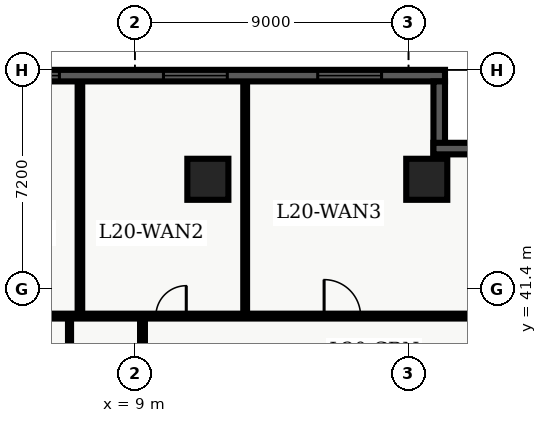
"""IFC4 building model, lengths in metres.
Left out: names, types, materials, properties, quantities, classifications, styles, units other than length and angle.
Written with IfcOpenShell. Run it as: python <this file> out.ifc"""

import sys

from ifc_helpers import new_model, entity, si_unit, converted_unit, direction, frame, origin_with_axes, origin_2d_with_axis, place, context, subcontext, project, spatial, polyline, rectangle, outline, extrude, element, fill, save


model = new_model("IFC4")
c1 = context("Model", 3, precision=1e-05, world=origin_with_axes(), true_north=direction((0.0, 1.0)))
c2 = subcontext(c1, "Body", "Model", "MODEL_VIEW")
j1 = project(units=[si_unit("LENGTHUNIT", "METRE"), converted_unit("PLANEANGLEUNIT", "DEGREE", entity("IfcPlaneAngleMeasure", 0.017), si_unit("PLANEANGLEUNIT", "RADIAN"), dimensions=[0, 0, 0, 0, 0, 0, 0])], contexts=[c1])
p1 = place(None, origin_with_axes())
s1 = spatial("IfcSite", under=j1, at=p1, CompositionType="ELEMENT")
p2 = place(p1, origin_with_axes())
s2 = spatial("IfcBuilding", under=s1, at=p2, CompositionType="ELEMENT")
p3 = place(p2, frame((0.0, 0.0, 84.6), z_axis=(0.0, 0.0, 1.0), x_axis=(1.0, 0.0, 0.0)))
s3 = spatial("IfcBuildingStorey", under=s2, at=p3, CompositionType="ELEMENT", Elevation=84.6)
for number, where, z_axis, x_axis in (
    (1, (11.4, 45.0, 0.0), (0.0, 0.0, 1.0), (1.0, 0.0, 0.0)),
    (2, (18.6, 45.0, 0.0), (0.0, 0.0, 1.0), (1.0, 0.0, 0.0)),
):
    element("IfcColumn", number, at=place(p3, frame(where, z_axis=z_axis, x_axis=x_axis)), inside=s3, PredefinedType="COLUMN", context=c2, shape_type="SweptSolid", body=[
        extrude(rectangle(XDim=1.35, YDim=1.35, at=origin_2d_with_axis()), origin_with_axes(), (0.0, 0.0, 1.0), 4.5),
    ])
p4 = place(p3, frame((2.6, 40.5, 0.0), z_axis=(0.0, 0.0, 1.0), x_axis=(1.0, 0.0, 0.0)))
e3 = element("IfcWall", 3, at=p4, inside=s3, PredefinedType="PARTITIONING", context=c2, shape_type="SweptSolid", body=[
    extrude(outline(polyline([(0.0, -0.08), (18.65, -0.08), (18.65, 0.08), (0.0, 0.08), (0.0, -0.08)])), origin_with_axes(), (0.0, 0.0, 1.0), 3.2),
])
p5 = place(p4, frame((2.291, 0.0, 0.0), z_axis=(0.0, 0.0, 1.0), x_axis=(1.0, 0.0, 0.0)))
e4 = element("IfcOpeningElement", 4, at=p5, cuts=e3, PredefinedType="OPENING", context=c2, shape_type="SweptSolid", body=[
    extrude(rectangle(XDim=1.0, YDim=0.18, at=origin_2d_with_axis()), origin_with_axes(), (0.0, 0.0, 1.0), 2.15),
])
p6 = place(p4, frame((7.59, 0.0, 0.0), z_axis=(0.0, 0.0, 1.0), x_axis=(1.0, 0.0, 0.0)))
e5 = element("IfcOpeningElement", 5, at=p6, cuts=e3, PredefinedType="OPENING", context=c2, shape_type="SweptSolid", body=[
    extrude(rectangle(XDim=1.0, YDim=0.18, at=origin_2d_with_axis()), origin_with_axes(), (0.0, 0.0, 1.0), 2.15),
])
p7 = place(p4, frame((13.223, 0.0, 0.0), z_axis=(0.0, 0.0, 1.0), x_axis=(1.0, 0.0, 0.0)))
e6 = element("IfcOpeningElement", 6, at=p7, cuts=e3, PredefinedType="OPENING", context=c2, shape_type="SweptSolid", body=[
    extrude(rectangle(XDim=1.2, YDim=0.18, at=origin_2d_with_axis()), origin_with_axes(), (0.0, 0.0, 1.0), 2.2),
])
p8 = place(p3, frame((9.25, 24.4, 0.0), z_axis=(0.0, 0.0, 1.0), x_axis=(0.0, 1.0, 0.0)))
e7 = element("IfcWall", 7, at=p8, inside=s3, PredefinedType="PARTITIONING", context=c2, shape_type="SweptSolid", body=[
    extrude(outline(polyline([(0.0, -0.08), (16.1, -0.08), (16.1, 0.08), (0.0, 0.08), (0.0, -0.08)])), origin_with_axes(), (0.0, 0.0, 1.0), 3.2),
])
p9 = place(p8, frame((1.966, 0.0, 0.0), z_axis=(0.0, 0.0, 1.0), x_axis=(1.0, 0.0, 0.0)))
e8 = element("IfcOpeningElement", 8, at=p9, cuts=e7, PredefinedType="OPENING", context=c2, shape_type="SweptSolid", body=[
    extrude(rectangle(XDim=1.0, YDim=0.18, at=origin_2d_with_axis()), origin_with_axes(), (0.0, 0.0, 1.0), 2.15),
])
p10 = place(p8, frame((11.001, 0.0, 0.0), z_axis=(0.0, 0.0, 1.0), x_axis=(1.0, 0.0, 0.0)))
e9 = element("IfcOpeningElement", 9, at=p10, cuts=e7, PredefinedType="OPENING", context=c2, shape_type="SweptSolid", body=[
    extrude(rectangle(XDim=1.0, YDim=0.18, at=origin_2d_with_axis()), origin_with_axes(), (0.0, 0.0, 1.0), 2.15),
])
p11 = place(p3, frame((6.85, 24.55, 0.0), z_axis=(0.0, 0.0, 1.0), x_axis=(0.0, 1.0, 0.0)))
e10 = element("IfcWall", 10, at=p11, inside=s3, PredefinedType="PARTITIONING", context=c2, shape_type="SweptSolid", body=[
    extrude(outline(polyline([(0.0, -0.05), (15.75, -0.05), (15.75, 0.05), (0.0, 0.05), (0.0, -0.05)])), origin_with_axes(), (0.0, 0.0, 1.0), 3.2),
])
p12 = place(p11, frame((3.466, 0.0, 0.0), z_axis=(0.0, 0.0, 1.0), x_axis=(1.0, 0.0, 0.0)))
e11 = element("IfcOpeningElement", 11, at=p12, cuts=e10, PredefinedType="OPENING", context=c2, shape_type="SweptSolid", body=[
    extrude(rectangle(XDim=0.95, YDim=0.12, at=origin_2d_with_axis()), origin_with_axes(), (0.0, 0.0, 1.0), 2.15),
])
p13 = place(p11, frame((10.851, 0.0, 0.0), z_axis=(0.0, 0.0, 1.0), x_axis=(1.0, 0.0, 0.0)))
e12 = element("IfcOpeningElement", 12, at=p13, cuts=e10, PredefinedType="OPENING", context=c2, shape_type="SweptSolid", body=[
    extrude(rectangle(XDim=0.95, YDim=0.12, at=origin_2d_with_axis()), origin_with_axes(), (0.0, 0.0, 1.0), 2.15),
])
p14 = place(p3, frame((7.192, 40.6, 0.0), z_axis=(0.0, 0.0, 1.0), x_axis=(0.0, 1.0, 0.0)))
e13 = element("IfcWall", 13, at=p14, inside=s3, PredefinedType="PARTITIONING", context=c2, shape_type="SweptSolid", body=[
    extrude(outline(polyline([(0.0, -0.075), (7.64, -0.075), (7.64, 0.075), (0.0, 0.075), (0.0, -0.075)])), origin_with_axes(), (0.0, 0.0, 1.0), 3.2),
])
p15 = place(p3, frame((12.627, 40.6, 0.0), z_axis=(0.0, 0.0, 1.0), x_axis=(0.0, 1.0, 0.0)))
e14 = element("IfcWall", 14, at=p15, inside=s3, PredefinedType="PARTITIONING", context=c2, shape_type="SweptSolid", body=[
    extrude(outline(polyline([(0.0, -0.062), (7.64, -0.062), (7.64, 0.062), (0.0, 0.062), (0.0, -0.062)])), origin_with_axes(), (0.0, 0.0, 1.0), 3.2),
])
p16 = place(p3, frame((2.78, 48.41, 0.0), z_axis=(0.0, 0.0, 1.0), x_axis=(1.0, 0.0, 0.0)))
e15 = element("IfcWall", 15, at=p16, inside=s3, PredefinedType="SOLIDWALL", context=c2, shape_type="SweptSolid", body=[
    extrude(outline(polyline([(0.0, -0.19), (16.42, -0.19), (16.42, 0.19), (0.0, 0.19), (0.0, -0.19)])), origin_with_axes(), (0.0, 0.0, 1.0), 4.26),
])
p17 = place(p16, frame((2.687, 0.0, 0.45), z_axis=(0.0, 0.0, 1.0), x_axis=(1.0, 0.0, 0.0)))
e16 = element("IfcOpeningElement", 16, at=p17, cuts=e15, PredefinedType="OPENING", context=c2, shape_type="SweptSolid", body=[
    extrude(rectangle(XDim=2.1, YDim=0.4, at=origin_2d_with_axis()), origin_with_axes(), (0.0, 0.0, 1.0), 2.2),
])
p18 = place(p16, frame((8.21, 0.0, 0.45), z_axis=(0.0, 0.0, 1.0), x_axis=(1.0, 0.0, 0.0)))
e17 = element("IfcOpeningElement", 17, at=p18, cuts=e15, PredefinedType="OPENING", context=c2, shape_type="SweptSolid", body=[
    extrude(rectangle(XDim=2.1, YDim=0.4, at=origin_2d_with_axis()), origin_with_axes(), (0.0, 0.0, 1.0), 2.2),
])
p19 = place(p16, frame((13.283, 0.0, 0.45), z_axis=(0.0, 0.0, 1.0), x_axis=(1.0, 0.0, 0.0)))
e18 = element("IfcOpeningElement", 18, at=p19, cuts=e15, PredefinedType="OPENING", context=c2, shape_type="SweptSolid", body=[
    extrude(rectangle(XDim=2.1, YDim=0.4, at=origin_2d_with_axis()), origin_with_axes(), (0.0, 0.0, 1.0), 2.2),
])
p20 = place(p3, frame((19.01, 48.22, 0.0), z_axis=(0.0, 0.0, 1.0), x_axis=(0.0, -1.0, 0.0)))
e19 = element("IfcWall", 19, at=p20, inside=s3, PredefinedType="SOLIDWALL", context=c2, shape_type="SweptSolid", body=[
    extrude(outline(polyline([(0.0, -0.19), (2.56, -0.19), (2.56, 0.19), (0.0, 0.19), (0.0, -0.19)])), origin_with_axes(), (0.0, 0.0, 1.0), 4.26),
])
p21 = place(p3, frame((18.82, 46.01, 0.0), z_axis=(0.0, 0.0, 1.0), x_axis=(1.0, 0.0, 0.0)))
e20 = element("IfcWall", 20, at=p21, inside=s3, PredefinedType="SOLIDWALL", context=c2, shape_type="SweptSolid", body=[
    extrude(outline(polyline([(0.0, -0.19), (2.78, -0.19), (2.78, 0.19), (0.0, 0.19), (0.0, -0.19)])), origin_with_axes(), (0.0, 0.0, 1.0), 4.26),
])
p22 = place(p4, frame((7.59, 0.0, 0.0), z_axis=(0.0, 0.0, 1.0), x_axis=(1.0, 0.0, 0.0)))
e21 = element("IfcDoor", 21, at=p22, inside=s3, OperationType="SINGLE_SWING_RIGHT", PredefinedType="DOOR", context=c2, shape_type="SweptSolid", body=[
    extrude(rectangle(XDim=1.0, YDim=0.09, at=origin_2d_with_axis()), origin_with_axes(), (0.0, 0.0, 1.0), 2.15),
])
fill(e5, e21)
p23 = place(p4, frame((13.223, 0.0, 0.0), z_axis=(0.0, 0.0, 1.0), x_axis=(1.0, 0.0, 0.0)))
e22 = element("IfcDoor", 22, at=p23, inside=s3, OperationType="SINGLE_SWING_LEFT", PredefinedType="DOOR", context=c2, shape_type="SweptSolid", body=[
    extrude(rectangle(XDim=1.2, YDim=0.09, at=origin_2d_with_axis()), origin_with_axes(), (0.0, 0.0, 1.0), 2.2),
])
fill(e6, e22)
p24 = place(p16, frame((2.687, 0.0, 0.45), z_axis=(0.0, 0.0, 1.0), x_axis=(1.0, 0.0, 0.0)))
e23 = element("IfcWindow", 23, at=p24, inside=s3, PredefinedType="WINDOW", context=c2, shape_type="SweptSolid", body=[
    extrude(rectangle(XDim=2.1, YDim=0.09, at=origin_2d_with_axis()), origin_with_axes(), (0.0, 0.0, 1.0), 2.2),
])
fill(e16, e23)
p25 = place(p16, frame((8.21, 0.0, 0.45), z_axis=(0.0, 0.0, 1.0), x_axis=(1.0, 0.0, 0.0)))
e24 = element("IfcWindow", 24, at=p25, inside=s3, PredefinedType="WINDOW", context=c2, shape_type="SweptSolid", body=[
    extrude(rectangle(XDim=2.1, YDim=0.09, at=origin_2d_with_axis()), origin_with_axes(), (0.0, 0.0, 1.0), 2.2),
])
fill(e17, e24)
p26 = place(p16, frame((13.283, 0.0, 0.45), z_axis=(0.0, 0.0, 1.0), x_axis=(1.0, 0.0, 0.0)))
e25 = element("IfcWindow", 25, at=p26, inside=s3, PredefinedType="WINDOW", context=c2, shape_type="SweptSolid", body=[
    extrude(rectangle(XDim=2.1, YDim=0.09, at=origin_2d_with_axis()), origin_with_axes(), (0.0, 0.0, 1.0), 2.2),
])
fill(e18, e25)
save(model, sys.argv[1])
